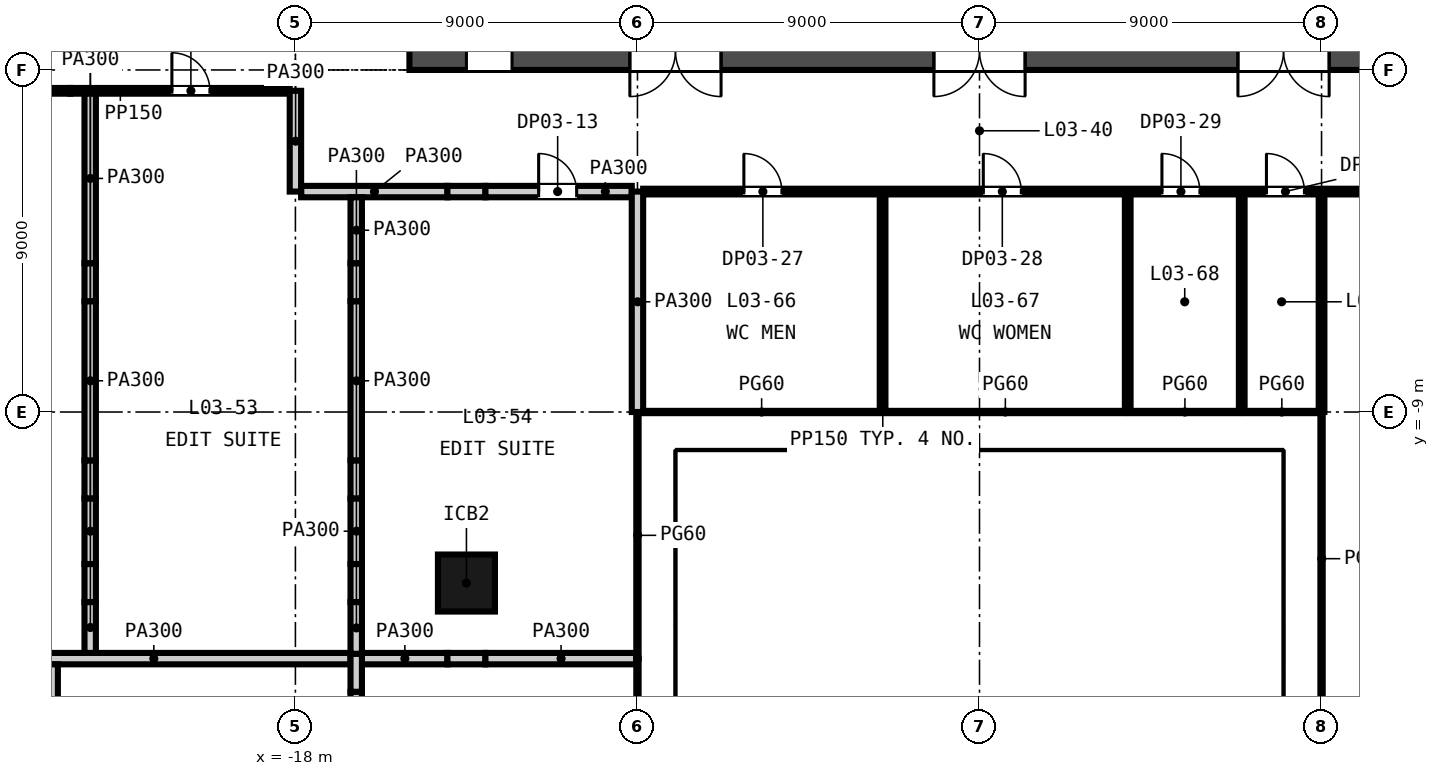
"""IFC4 building model, lengths in metres.
Left out: names, types, materials, properties, quantities, classifications, styles, units other than length and angle.
Written with IfcOpenShell. Run it as: python <this file> out.ifc"""

import sys

from ifc_helpers import new_model, si_unit, direction, frame, frame_2d, origin, origin_2d, place, context, subcontext, project, spatial, rectangle, extrude, element, fill, save


model = new_model("IFC4")
c1 = context("Model", 3, precision=1e-05, world=origin(), true_north=direction((0.0, 1.0)))
c2 = subcontext(c1, "Body", "Model", "MODEL_VIEW")
j1 = project(units=[si_unit("LENGTHUNIT", "METRE"), si_unit("PLANEANGLEUNIT", "RADIAN")], contexts=[c1])
p1 = place(None, origin())
s1 = spatial("IfcSite", under=j1, at=p1, CompositionType="ELEMENT")
p2 = place(p1, origin())
s2 = spatial("IfcBuilding", under=s1, at=p2, CompositionType="ELEMENT")
p3 = place(p2, frame((0.0, 0.0, 22.5)))
s3 = spatial("IfcBuildingStorey", under=s2, at=p3, CompositionType="ELEMENT", Elevation=22.5)
p4 = place(p3, frame((-15.0, 0.5, -0.3), z_axis=(0.0, 0.0, 1.0), x_axis=(1.0, 0.0, 0.0)))
e1 = element("IfcWall", 1, at=p4, inside=s3, PredefinedType="SOLIDWALL", context=c2, shape_type="SweptSolid", body=[
    extrude(rectangle(XDim=30.0, YDim=1.0, at=frame_2d((15.0, 0.0))), origin(), (0.0, 0.0, 1.0), 4.5),
])
p5 = place(p4, frame((5.8, 0.0, 0.3)))
e2 = element("IfcOpeningElement", 2, at=p5, cuts=e1, PredefinedType="OPENING", context=c2, shape_type="SweptSolid", body=[
    extrude(rectangle(XDim=2.4, YDim=2.4, at=frame_2d((1.2, 1.2))), frame((0.0, 0.51, 0.0), z_axis=(0.0, -1.0, 0.0), x_axis=(1.0, 0.0, 0.0)), (0.0, 0.0, 1.0), 1.02),
])
p6 = place(p4, frame((13.8, 0.0, 0.3)))
e3 = element("IfcOpeningElement", 3, at=p6, cuts=e1, PredefinedType="OPENING", context=c2, shape_type="SweptSolid", body=[
    extrude(rectangle(XDim=2.4, YDim=2.4, at=frame_2d((1.2, 1.2))), frame((0.0, 0.51, 0.0), z_axis=(0.0, -1.0, 0.0), x_axis=(1.0, 0.0, 0.0)), (0.0, 0.0, 1.0), 1.02),
])
p7 = place(p4, frame((21.8, 0.0, 0.3)))
e4 = element("IfcOpeningElement", 4, at=p7, cuts=e1, PredefinedType="OPENING", context=c2, shape_type="SweptSolid", body=[
    extrude(rectangle(XDim=2.4, YDim=2.4, at=frame_2d((1.2, 1.2))), frame((0.0, 0.51, 0.0), z_axis=(0.0, -1.0, 0.0), x_axis=(1.0, 0.0, 0.0)), (0.0, 0.0, 1.0), 1.02),
])
p8 = place(p4, frame((1.5, 0.0, 0.3)))
e5 = element("IfcOpeningElement", 5, at=p8, cuts=e1, PredefinedType="OPENING", context=c2, shape_type="SweptSolid", body=[
    extrude(rectangle(XDim=1.2, YDim=2.1, at=frame_2d((0.6, 1.05))), frame((0.0, 0.51, 0.0), z_axis=(0.0, -1.0, 0.0), x_axis=(1.0, 0.0, 0.0)), (0.0, 0.0, 1.0), 1.02),
])
p9 = place(p4, frame((27.3, 0.0, 0.3)))
e6 = element("IfcOpeningElement", 6, at=p9, cuts=e1, PredefinedType="OPENING", context=c2, shape_type="SweptSolid", body=[
    extrude(rectangle(XDim=1.2, YDim=2.1, at=frame_2d((0.6, 1.05))), frame((0.0, 0.51, 0.0), z_axis=(0.0, -1.0, 0.0), x_axis=(1.0, 0.0, 0.0)), (0.0, 0.0, 1.0), 1.02),
])
p10 = place(p3, frame((-13.5, -13.5, -0.3), z_axis=(0.0, 0.0, 1.0), x_axis=(1.0, 0.0, 0.0)))
e7 = element("IfcColumn", 7, at=p10, inside=s3, PredefinedType="COLUMN", context=c2, shape_type="SweptSolid", body=[
    extrude(rectangle(XDim=1.5, YDim=1.5, at=origin_2d()), origin(), (0.0, 0.0, 1.0), 4.5),
])
p11 = place(p3, frame((-26.911, -15.489, 0.0), z_axis=(0.0, 0.0, 1.0), x_axis=(1.0, 0.0, 0.0)))
e8 = element("IfcWall", 8, at=p11, inside=s3, PredefinedType="PARTITIONING", context=c2, shape_type="SweptSolid", body=[
    extrude(rectangle(XDim=10.361, YDim=0.3, at=frame_2d((5.18, 0.0))), origin(), (0.0, 0.0, 1.0), 4.2),
])
p12 = place(p3, frame((-16.25, -15.489, 0.0), z_axis=(0.0, 0.0, 1.0), x_axis=(1.0, 0.0, 0.0)))
e9 = element("IfcWall", 9, at=p12, inside=s3, PredefinedType="PARTITIONING", context=c2, shape_type="SweptSolid", body=[
    extrude(rectangle(XDim=2.25, YDim=0.3, at=frame_2d((1.125, 0.0))), origin(), (0.0, 0.0, 1.0), 4.2),
])
p13 = place(p3, frame((-14.0, -15.489, 0.0), z_axis=(0.0, 0.0, 1.0), x_axis=(1.0, 0.0, 0.0)))
e10 = element("IfcWall", 10, at=p13, inside=s3, PredefinedType="PARTITIONING", context=c2, shape_type="SweptSolid", body=[
    extrude(rectangle(XDim=1.0, YDim=0.3, at=frame_2d((0.5, 0.0))), origin(), (0.0, 0.0, 1.0), 3.521),
])
p14 = place(p3, frame((-13.0, -15.489, 0.0), z_axis=(0.0, 0.0, 1.0), x_axis=(1.0, 0.0, 0.0)))
e11 = element("IfcWall", 11, at=p14, inside=s3, PredefinedType="PARTITIONING", context=c2, shape_type="SweptSolid", body=[
    extrude(rectangle(XDim=3.97, YDim=0.3, at=frame_2d((1.985, 0.0))), origin(), (0.0, 0.0, 1.0), 4.2),
])
p15 = place(p3, frame((-8.85, -9.0, 0.0), z_axis=(0.0, 0.0, 1.0), x_axis=(1.0, 0.0, 0.0)))
e12 = element("IfcWall", 12, at=p15, inside=s3, PredefinedType="PARTITIONING", context=c2, shape_type="SweptSolid", body=[
    extrude(rectangle(XDim=6.225, YDim=0.06, at=frame_2d((3.113, 0.0))), origin(), (0.0, 0.0, 1.0), 4.2),
])
p16 = place(p3, frame((-2.475, -9.0, 0.0), z_axis=(0.0, 0.0, 1.0), x_axis=(1.0, 0.0, 0.0)))
e13 = element("IfcWall", 13, at=p16, inside=s3, PredefinedType="PARTITIONING", context=c2, shape_type="SweptSolid", body=[
    extrude(rectangle(XDim=6.3, YDim=0.06, at=frame_2d((3.15, 0.0))), origin(), (0.0, 0.0, 1.0), 4.2),
])
p17 = place(p3, frame((3.975, -9.0, 0.0), z_axis=(0.0, 0.0, 1.0), x_axis=(1.0, 0.0, 0.0)))
e14 = element("IfcWall", 14, at=p17, inside=s3, PredefinedType="PARTITIONING", context=c2, shape_type="SweptSolid", body=[
    extrude(rectangle(XDim=2.85, YDim=0.06, at=frame_2d((1.425, 0.0))), origin(), (0.0, 0.0, 1.0), 4.2),
])
p18 = place(p3, frame((6.975, -9.0, 0.0), z_axis=(0.0, 0.0, 1.0), x_axis=(1.0, 0.0, 0.0)))
e15 = element("IfcWall", 15, at=p18, inside=s3, PredefinedType="PARTITIONING", context=c2, shape_type="SweptSolid", body=[
    extrude(rectangle(XDim=1.95, YDim=0.06, at=frame_2d((0.975, 0.0))), origin(), (0.0, 0.0, 1.0), 4.2),
])
p19 = place(p3, frame((-17.85, -3.2, 0.0), z_axis=(0.0, 0.0, 1.0), x_axis=(1.0, 0.0, 0.0)))
e16 = element("IfcWall", 16, at=p19, inside=s3, PredefinedType="PARTITIONING", context=c2, shape_type="SweptSolid", body=[
    extrude(rectangle(XDim=3.85, YDim=0.3, at=frame_2d((1.925, 0.0))), origin(), (0.0, 0.0, 1.0), 4.2),
])
p20 = place(p3, frame((-14.0, -3.2, 0.0), z_axis=(0.0, 0.0, 1.0), x_axis=(1.0, 0.0, 0.0)))
e17 = element("IfcWall", 17, at=p20, inside=s3, PredefinedType="PARTITIONING", context=c2, shape_type="SweptSolid", body=[
    extrude(rectangle(XDim=1.0, YDim=0.3, at=frame_2d((0.5, 0.0))), origin(), (0.0, 0.0, 1.0), 3.451),
])
p21 = place(p3, frame((-13.0, -3.2, 0.0), z_axis=(0.0, 0.0, 1.0), x_axis=(1.0, 0.0, 0.0)))
e18 = element("IfcWall", 18, at=p21, inside=s3, PredefinedType="PARTITIONING", context=c2, shape_type="SweptSolid", body=[
    extrude(rectangle(XDim=3.85, YDim=0.3, at=frame_2d((1.925, 0.0))), origin(), (0.0, 0.0, 1.0), 4.2),
])
p22 = place(p21, frame((1.4, 0.0, 0.0)))
e19 = element("IfcOpeningElement", 19, at=p22, cuts=e18, PredefinedType="OPENING", context=c2, shape_type="SweptSolid", body=[
    extrude(rectangle(XDim=1.0, YDim=2.1, at=frame_2d((0.5, 1.05))), frame((0.0, 0.16, 0.0), z_axis=(0.0, -1.0, 0.0), x_axis=(1.0, 0.0, 0.0)), (0.0, 0.0, 1.0), 0.32),
])
p23 = place(p3, frame((-8.85, -3.2, 0.0), z_axis=(0.0, 0.0, 1.0), x_axis=(1.0, 0.0, 0.0)))
e20 = element("IfcWall", 20, at=p23, inside=s3, PredefinedType="PARTITIONING", context=c2, shape_type="SweptSolid", body=[
    extrude(rectangle(XDim=41.831, YDim=0.15, at=frame_2d((20.916, 0.0))), origin(), (0.0, 0.0, 1.0), 4.2),
])
p24 = place(p23, frame((21.75, 0.0, 0.0)))
e21 = element("IfcOpeningElement", 21, at=p24, cuts=e20, PredefinedType="OPENING", context=c2, shape_type="SweptSolid", body=[
    extrude(rectangle(XDim=1.0, YDim=2.1, at=frame_2d((0.5, 1.05))), frame((0.0, 0.085, 0.0), z_axis=(0.0, -1.0, 0.0), x_axis=(1.0, 0.0, 0.0)), (0.0, 0.0, 1.0), 0.17),
])
p25 = place(p23, frame((28.25, 0.0, 0.0)))
e22 = element("IfcOpeningElement", 22, at=p25, cuts=e20, PredefinedType="OPENING", context=c2, shape_type="SweptSolid", body=[
    extrude(rectangle(XDim=1.0, YDim=2.1, at=frame_2d((0.5, 1.05))), frame((0.0, 0.085, 0.0), z_axis=(0.0, -1.0, 0.0), x_axis=(1.0, 0.0, 0.0)), (0.0, 0.0, 1.0), 0.17),
])
p26 = place(p23, frame((2.65, 0.0, 0.0)))
e23 = element("IfcOpeningElement", 23, at=p26, cuts=e20, PredefinedType="OPENING", context=c2, shape_type="SweptSolid", body=[
    extrude(rectangle(XDim=1.0, YDim=2.1, at=frame_2d((0.5, 1.05))), frame((0.0, 0.085, 0.0), z_axis=(0.0, -1.0, 0.0), x_axis=(1.0, 0.0, 0.0)), (0.0, 0.0, 1.0), 0.17),
])
p27 = place(p23, frame((8.95, 0.0, 0.0)))
e24 = element("IfcOpeningElement", 24, at=p27, cuts=e20, PredefinedType="OPENING", context=c2, shape_type="SweptSolid", body=[
    extrude(rectangle(XDim=1.0, YDim=2.1, at=frame_2d((0.5, 1.05))), frame((0.0, 0.085, 0.0), z_axis=(0.0, -1.0, 0.0), x_axis=(1.0, 0.0, 0.0)), (0.0, 0.0, 1.0), 0.17),
])
p28 = place(p23, frame((13.65, 0.0, 0.0)))
e25 = element("IfcOpeningElement", 25, at=p28, cuts=e20, PredefinedType="OPENING", context=c2, shape_type="SweptSolid", body=[
    extrude(rectangle(XDim=1.0, YDim=2.1, at=frame_2d((0.5, 1.05))), frame((0.0, 0.085, 0.0), z_axis=(0.0, -1.0, 0.0), x_axis=(1.0, 0.0, 0.0)), (0.0, 0.0, 1.0), 0.17),
])
p29 = place(p23, frame((16.4, 0.0, 0.0)))
e26 = element("IfcOpeningElement", 26, at=p29, cuts=e20, PredefinedType="OPENING", context=c2, shape_type="SweptSolid", body=[
    extrude(rectangle(XDim=1.0, YDim=2.1, at=frame_2d((0.5, 1.05))), frame((0.0, 0.085, 0.0), z_axis=(0.0, -1.0, 0.0), x_axis=(1.0, 0.0, 0.0)), (0.0, 0.0, 1.0), 0.17),
])
p30 = place(p3, frame((-31.859, -0.549, 0.0), z_axis=(0.0, 0.0, 1.0), x_axis=(1.0, 0.0, 0.0)))
e27 = element("IfcWall", 27, at=p30, inside=s3, PredefinedType="PARTITIONING", context=c2, shape_type="SweptSolid", body=[
    extrude(rectangle(XDim=7.936, YDim=0.15, at=frame_2d((3.968, 0.0))), origin(), (0.0, 0.0, 1.0), 4.2),
])
p31 = place(p30, frame((3.4, 0.0, 0.0)))
e28 = element("IfcOpeningElement", 28, at=p31, cuts=e27, PredefinedType="OPENING", context=c2, shape_type="SweptSolid", body=[
    extrude(rectangle(XDim=1.0, YDim=2.1, at=frame_2d((0.5, 1.05))), frame((0.0, 0.085, 0.0), z_axis=(0.0, -1.0, 0.0), x_axis=(1.0, 0.0, 0.0)), (0.0, 0.0, 1.0), 0.17),
])
p32 = place(p3, frame((-23.923, -0.549, 0.0), z_axis=(0.0, 0.0, 1.0), x_axis=(1.0, 0.0, 0.0)))
e29 = element("IfcWall", 29, at=p32, inside=s3, PredefinedType="PARTITIONING", context=c2, shape_type="SweptSolid", body=[
    extrude(rectangle(XDim=5.773, YDim=0.15, at=frame_2d((2.886, 0.0))), origin(), (0.0, 0.0, 1.0), 3.521),
])
p33 = place(p32, frame((2.673, 0.0, 0.0)))
e30 = element("IfcOpeningElement", 30, at=p33, cuts=e29, PredefinedType="OPENING", context=c2, shape_type="SweptSolid", body=[
    extrude(rectangle(XDim=1.0, YDim=2.1, at=frame_2d((0.5, 1.05))), frame((0.0, 0.085, 0.0), z_axis=(0.0, -1.0, 0.0), x_axis=(1.0, 0.0, 0.0)), (0.0, 0.0, 1.0), 0.17),
])
p34 = place(p3, frame((-24.4, -16.639, 0.0), z_axis=(0.0, 0.0, 1.0), x_axis=(0.0, 1.0, 0.0)))
e31 = element("IfcWall", 31, at=p34, inside=s3, PredefinedType="PARTITIONING", context=c2, shape_type="SweptSolid", body=[
    extrude(rectangle(XDim=1.0, YDim=0.3, at=frame_2d((0.5, 0.0))), origin(), (0.0, 0.0, 1.0), 3.451),
])
p35 = place(p3, frame((-23.4, -15.339, 0.0), z_axis=(0.0, 0.0, 1.0), x_axis=(0.0, 1.0, 0.0)))
e32 = element("IfcWall", 32, at=p35, inside=s3, PredefinedType="PARTITIONING", context=c2, shape_type="SweptSolid", body=[
    extrude(rectangle(XDim=1.339, YDim=0.3, at=frame_2d((0.669, 0.0))), origin(), (0.0, 0.0, 1.0), 4.2),
])
p36 = place(p3, frame((-23.4, -14.0, 0.0), z_axis=(0.0, 0.0, 1.0), x_axis=(0.0, 1.0, 0.0)))
e33 = element("IfcWall", 33, at=p36, inside=s3, PredefinedType="PARTITIONING", context=c2, shape_type="SweptSolid", body=[
    extrude(rectangle(XDim=1.0, YDim=0.3, at=frame_2d((0.5, 0.0))), origin(), (0.0, 0.0, 1.0), 3.441),
])
p37 = place(p3, frame((-23.4, -13.0, 0.0), z_axis=(0.0, 0.0, 1.0), x_axis=(0.0, 1.0, 0.0)))
e34 = element("IfcWall", 34, at=p37, inside=s3, PredefinedType="PARTITIONING", context=c2, shape_type="SweptSolid", body=[
    extrude(rectangle(XDim=1.727, YDim=0.3, at=frame_2d((0.864, 0.0))), origin(), (0.0, 0.0, 1.0), 4.2),
])
p38 = place(p3, frame((-23.4, -11.273, 0.0), z_axis=(0.0, 0.0, 1.0), x_axis=(0.0, 1.0, 0.0)))
e35 = element("IfcWall", 35, at=p38, inside=s3, PredefinedType="PARTITIONING", context=c2, shape_type="SweptSolid", body=[
    extrude(rectangle(XDim=1.0, YDim=0.3, at=frame_2d((0.5, 0.0))), origin(), (0.0, 0.0, 1.0), 3.521),
])
p39 = place(p3, frame((-23.4, -10.273, 0.0), z_axis=(0.0, 0.0, 1.0), x_axis=(0.0, 1.0, 0.0)))
e36 = element("IfcWall", 36, at=p39, inside=s3, PredefinedType="PARTITIONING", context=c2, shape_type="SweptSolid", body=[
    extrude(rectangle(XDim=4.188, YDim=0.3, at=frame_2d((2.094, 0.0))), origin(), (0.0, 0.0, 1.0), 4.2),
])
p40 = place(p3, frame((-23.4, -6.084, 0.0), z_axis=(0.0, 0.0, 1.0), x_axis=(0.0, 1.0, 0.0)))
e37 = element("IfcWall", 37, at=p40, inside=s3, PredefinedType="PARTITIONING", context=c2, shape_type="SweptSolid", body=[
    extrude(rectangle(XDim=1.0, YDim=0.3, at=frame_2d((0.5, 0.0))), origin(), (0.0, 0.0, 1.0), 3.521),
])
p41 = place(p3, frame((-23.4, -5.084, 0.0), z_axis=(0.0, 0.0, 1.0), x_axis=(0.0, 1.0, 0.0)))
e38 = element("IfcWall", 38, at=p41, inside=s3, PredefinedType="PARTITIONING", context=c2, shape_type="SweptSolid", body=[
    extrude(rectangle(XDim=4.46, YDim=0.3, at=frame_2d((2.23, 0.0))), origin(), (0.0, 0.0, 1.0), 4.2),
])
p42 = place(p3, frame((-18.0, -3.2, 0.0), z_axis=(0.0, 0.0, 1.0), x_axis=(0.0, 1.0, 0.0)))
e39 = element("IfcWall", 39, at=p42, inside=s3, PredefinedType="PARTITIONING", context=c2, shape_type="SweptSolid", body=[
    extrude(rectangle(XDim=2.651, YDim=0.3, at=frame_2d((1.326, 0.0))), origin(), (0.0, 0.0, 1.0), 4.2),
])
p43 = place(p3, frame((-16.4, -19.817, 0.0), z_axis=(0.0, 0.0, 1.0), x_axis=(0.0, 1.0, 0.0)))
e40 = element("IfcWall", 40, at=p43, inside=s3, PredefinedType="PARTITIONING", context=c2, shape_type="SweptSolid", body=[
    extrude(rectangle(XDim=3.456, YDim=0.3, at=frame_2d((1.728, 0.0))), origin(), (0.0, 0.0, 1.0), 4.2),
])
p44 = place(p3, frame((-16.4, -16.361, 0.0), z_axis=(0.0, 0.0, 1.0), x_axis=(0.0, 1.0, 0.0)))
e41 = element("IfcWall", 41, at=p44, inside=s3, PredefinedType="PARTITIONING", context=c2, shape_type="SweptSolid", body=[
    extrude(rectangle(XDim=1.0, YDim=0.3, at=frame_2d((0.5, 0.0))), origin(), (0.0, 0.0, 1.0), 3.451),
])
p45 = place(p3, frame((-16.4, -15.361, 0.0), z_axis=(0.0, 0.0, 1.0), x_axis=(0.0, 1.0, 0.0)))
e42 = element("IfcWall", 42, at=p45, inside=s3, PredefinedType="PARTITIONING", context=c2, shape_type="SweptSolid", body=[
    extrude(rectangle(XDim=1.361, YDim=0.3, at=frame_2d((0.681, 0.0))), origin(), (0.0, 0.0, 1.0), 4.2),
])
p46 = place(p3, frame((-16.4, -14.0, 0.0), z_axis=(0.0, 0.0, 1.0), x_axis=(0.0, 1.0, 0.0)))
e43 = element("IfcWall", 43, at=p46, inside=s3, PredefinedType="PARTITIONING", context=c2, shape_type="SweptSolid", body=[
    extrude(rectangle(XDim=1.0, YDim=0.3, at=frame_2d((0.5, 0.0))), origin(), (0.0, 0.0, 1.0), 3.441),
])
p47 = place(p3, frame((-16.4, -13.0, 0.0), z_axis=(0.0, 0.0, 1.0), x_axis=(0.0, 1.0, 0.0)))
e44 = element("IfcWall", 44, at=p47, inside=s3, PredefinedType="PARTITIONING", context=c2, shape_type="SweptSolid", body=[
    extrude(rectangle(XDim=1.727, YDim=0.3, at=frame_2d((0.864, 0.0))), origin(), (0.0, 0.0, 1.0), 4.2),
])
p48 = place(p3, frame((-16.4, -11.273, 0.0), z_axis=(0.0, 0.0, 1.0), x_axis=(0.0, 1.0, 0.0)))
e45 = element("IfcWall", 45, at=p48, inside=s3, PredefinedType="PARTITIONING", context=c2, shape_type="SweptSolid", body=[
    extrude(rectangle(XDim=1.0, YDim=0.3, at=frame_2d((0.5, 0.0))), origin(), (0.0, 0.0, 1.0), 3.521),
])
p49 = place(p3, frame((-16.4, -10.273, 0.0), z_axis=(0.0, 0.0, 1.0), x_axis=(0.0, 1.0, 0.0)))
e46 = element("IfcWall", 46, at=p49, inside=s3, PredefinedType="PARTITIONING", context=c2, shape_type="SweptSolid", body=[
    extrude(rectangle(XDim=4.188, YDim=0.3, at=frame_2d((2.094, 0.0))), origin(), (0.0, 0.0, 1.0), 4.2),
])
p50 = place(p3, frame((-16.4, -6.084, 0.0), z_axis=(0.0, 0.0, 1.0), x_axis=(0.0, 1.0, 0.0)))
e47 = element("IfcWall", 47, at=p50, inside=s3, PredefinedType="PARTITIONING", context=c2, shape_type="SweptSolid", body=[
    extrude(rectangle(XDim=1.0, YDim=0.3, at=frame_2d((0.5, 0.0))), origin(), (0.0, 0.0, 1.0), 3.521),
])
p51 = place(p3, frame((-16.4, -5.084, 0.0), z_axis=(0.0, 0.0, 1.0), x_axis=(0.0, 1.0, 0.0)))
e48 = element("IfcWall", 48, at=p51, inside=s3, PredefinedType="PARTITIONING", context=c2, shape_type="SweptSolid", body=[
    extrude(rectangle(XDim=1.734, YDim=0.3, at=frame_2d((0.867, 0.0))), origin(), (0.0, 0.0, 1.0), 4.2),
])
p52 = place(p3, frame((-9.0, -27.778, 0.0), z_axis=(0.0, 0.0, 1.0), x_axis=(0.0, 1.0, 0.0)))
e49 = element("IfcWall", 49, at=p52, inside=s3, PredefinedType="PARTITIONING", context=c2, shape_type="SweptSolid", body=[
    extrude(rectangle(XDim=12.288, YDim=0.06, at=frame_2d((6.144, 0.0))), origin(), (0.0, 0.0, 1.0), 4.2),
])
p53 = place(p3, frame((-9.0, -15.489, 0.0), z_axis=(0.0, 0.0, 1.0), x_axis=(0.0, 1.0, 0.0)))
e50 = element("IfcWall", 50, at=p53, inside=s3, PredefinedType="PARTITIONING", context=c2, shape_type="SweptSolid", body=[
    extrude(rectangle(XDim=6.488, YDim=0.06, at=frame_2d((3.244, 0.0))), origin(), (0.0, 0.0, 1.0), 4.2),
])
p54 = place(p3, frame((-9.0, -9.0, 0.0), z_axis=(0.0, 0.0, 1.0), x_axis=(0.0, 1.0, 0.0)))
e51 = element("IfcWall", 51, at=p54, inside=s3, PredefinedType="PARTITIONING", context=c2, shape_type="SweptSolid", body=[
    extrude(rectangle(XDim=5.8, YDim=0.3, at=frame_2d((2.9, 0.0))), origin(), (0.0, 0.0, 1.0), 4.2),
])
for number, where, z_axis, x_axis in (
    (52, (-2.55, -9.0, 0.0), (0.0, 0.0, 1.0), (0.0, 1.0, 0.0)),
    (53, (3.9, -9.0, 0.0), (0.0, 0.0, 1.0), (0.0, 1.0, 0.0)),
    (54, (6.9, -9.0, 0.0), (0.0, 0.0, 1.0), (0.0, 1.0, 0.0)),
):
    element("IfcWall", number, at=place(p3, frame(where, z_axis=z_axis, x_axis=x_axis)), inside=s3, PredefinedType="PARTITIONING", context=c2, shape_type="SweptSolid", body=[
        extrude(rectangle(XDim=5.725, YDim=0.15, at=frame_2d((2.863, 0.0))), origin(), (0.0, 0.0, 1.0), 4.2),
    ])
p55 = place(p3, frame((9.0, -16.717, 0.0), z_axis=(0.0, 0.0, 1.0), x_axis=(0.0, 1.0, 0.0)))
e55 = element("IfcWall", 55, at=p55, inside=s3, PredefinedType="PARTITIONING", context=c2, shape_type="SweptSolid", body=[
    extrude(rectangle(XDim=7.716, YDim=0.06, at=frame_2d((3.858, 0.0))), origin(), (0.0, 0.0, 1.0), 4.2),
])
p56 = place(p3, frame((9.0, -9.0, 0.0), z_axis=(0.0, 0.0, 1.0), x_axis=(0.0, 1.0, 0.0)))
e56 = element("IfcWall", 56, at=p56, inside=s3, PredefinedType="PARTITIONING", context=c2, shape_type="SweptSolid", body=[
    extrude(rectangle(XDim=5.725, YDim=0.15, at=frame_2d((2.863, 0.0))), origin(), (0.0, 0.0, 1.0), 4.2),
])
p57 = place(p33, origin())
e57 = element("IfcDoor", 57, at=p57, inside=s3, OperationType="SINGLE_SWING_LEFT", PredefinedType="DOOR", context=c2, shape_type="SweptSolid", body=[
    extrude(rectangle(XDim=1.0, YDim=2.1, at=frame_2d((0.5, 1.05))), frame((0.0, 0.025, 0.0), z_axis=(0.0, -1.0, 0.0), x_axis=(1.0, 0.0, 0.0)), (0.0, 0.0, 1.0), 0.05),
])
fill(e30, e57)
p58 = place(p22, origin())
e58 = element("IfcDoor", 58, at=p58, inside=s3, OperationType="SINGLE_SWING_LEFT", PredefinedType="DOOR", context=c2, shape_type="SweptSolid", body=[
    extrude(rectangle(XDim=1.0, YDim=2.1, at=frame_2d((0.5, 1.05))), frame((0.0, 0.025, 0.0), z_axis=(0.0, -1.0, 0.0), x_axis=(1.0, 0.0, 0.0)), (0.0, 0.0, 1.0), 0.05),
])
fill(e19, e58)
p59 = place(p26, origin())
e59 = element("IfcDoor", 59, at=p59, inside=s3, OperationType="SINGLE_SWING_LEFT", PredefinedType="DOOR", context=c2, shape_type="SweptSolid", body=[
    extrude(rectangle(XDim=1.0, YDim=2.1, at=frame_2d((0.5, 1.05))), frame((0.0, 0.025, 0.0), z_axis=(0.0, -1.0, 0.0), x_axis=(1.0, 0.0, 0.0)), (0.0, 0.0, 1.0), 0.05),
])
fill(e23, e59)
p60 = place(p27, origin())
e60 = element("IfcDoor", 60, at=p60, inside=s3, OperationType="SINGLE_SWING_LEFT", PredefinedType="DOOR", context=c2, shape_type="SweptSolid", body=[
    extrude(rectangle(XDim=1.0, YDim=2.1, at=frame_2d((0.5, 1.05))), frame((0.0, 0.025, 0.0), z_axis=(0.0, -1.0, 0.0), x_axis=(1.0, 0.0, 0.0)), (0.0, 0.0, 1.0), 0.05),
])
fill(e24, e60)
p61 = place(p28, origin())
e61 = element("IfcDoor", 61, at=p61, inside=s3, OperationType="SINGLE_SWING_LEFT", PredefinedType="DOOR", context=c2, shape_type="SweptSolid", body=[
    extrude(rectangle(XDim=1.0, YDim=2.1, at=frame_2d((0.5, 1.05))), frame((0.0, 0.025, 0.0), z_axis=(0.0, -1.0, 0.0), x_axis=(1.0, 0.0, 0.0)), (0.0, 0.0, 1.0), 0.05),
])
fill(e25, e61)
p62 = place(p29, origin())
e62 = element("IfcDoor", 62, at=p62, inside=s3, OperationType="SINGLE_SWING_LEFT", PredefinedType="DOOR", context=c2, shape_type="SweptSolid", body=[
    extrude(rectangle(XDim=1.0, YDim=2.1, at=frame_2d((0.5, 1.05))), frame((0.0, 0.025, 0.0), z_axis=(0.0, -1.0, 0.0), x_axis=(1.0, 0.0, 0.0)), (0.0, 0.0, 1.0), 0.05),
])
fill(e26, e62)
save(model, sys.argv[1])
